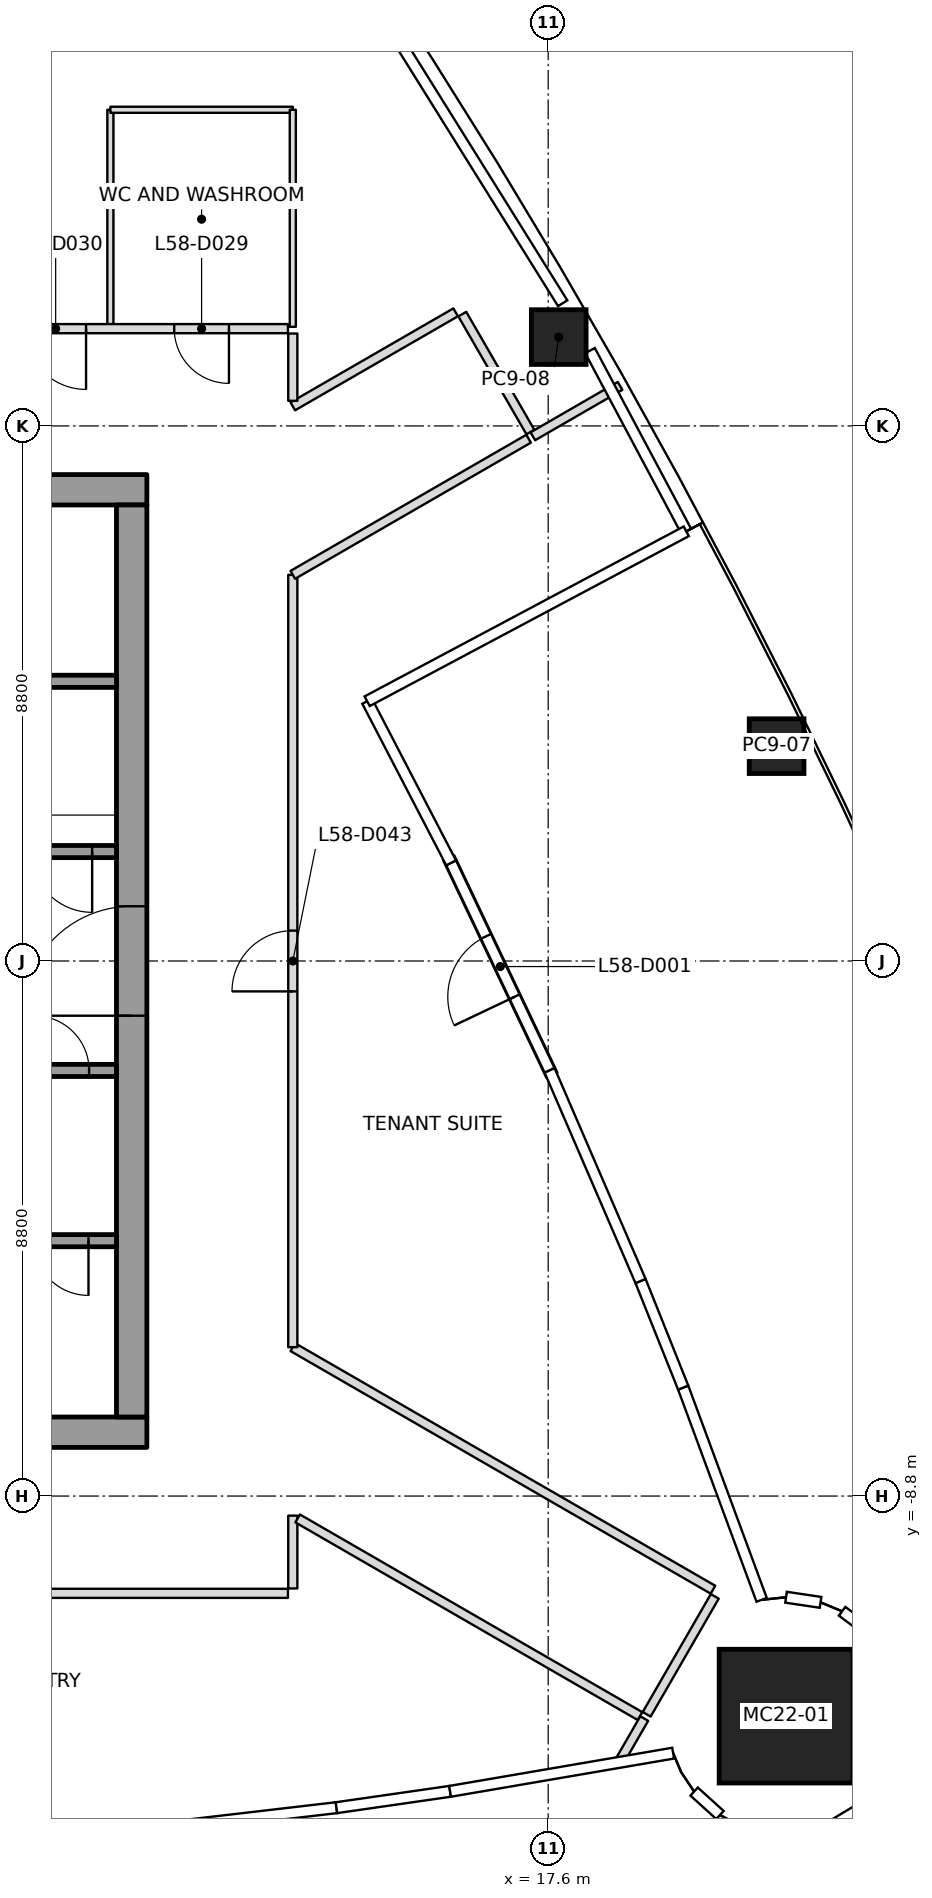
"""IFC4 building model, lengths in metres.
Left out: names, types, materials, properties, quantities, classifications, styles, units other than length and angle.
Written with IfcOpenShell. Run it as: python <this file> out.ifc"""

import sys

from ifc_helpers import new_model, si_unit, direction, frame, frame_2d, origin, origin_2d, place, context, subcontext, project, spatial, rectangle, extrude, element, fill, save


model = new_model("IFC4")
c1 = context("Model", 3, precision=1e-05, world=origin(), true_north=direction((0.0, 1.0)))
c2 = subcontext(c1, "Body", "Model", "MODEL_VIEW")
j1 = project(units=[si_unit("LENGTHUNIT", "METRE"), si_unit("PLANEANGLEUNIT", "RADIAN")], contexts=[c1])
p1 = place(None, origin())
s1 = spatial("IfcSite", under=j1, at=p1, CompositionType="ELEMENT")
p2 = place(p1, origin())
s2 = spatial("IfcBuilding", under=s1, at=p2, CompositionType="ELEMENT")
p3 = place(p2, frame((0.0, 0.0, 259.0)))
s3 = spatial("IfcBuildingStorey", under=s2, at=p3, CompositionType="ELEMENT", Elevation=259.0)
p4 = place(p3, frame((21.512, -12.42, 0.0), z_axis=(-0.027817676907, 0.016043967164, 0.999484250986), x_axis=(0.999613013546, 0.000446478676, 0.027814093645)))
e1 = element("IfcColumn", 1, at=p4, inside=s3, PredefinedType="COLUMN", context=c2, shape_type="SweptSolid", body=[
    extrude(rectangle(XDim=2.2, YDim=2.2, at=origin_2d()), origin(), (0.0, 0.0, 1.0), 4.002),
])
p5 = place(p3, frame((21.356, 3.533, 0.0), z_axis=(-0.014036674448, 0.002013957638, 0.999899452818), x_axis=(-0.439532201194, 0.89819139108, -0.007979292125)))
e2 = element("IfcColumn", 2, at=p5, inside=s3, PredefinedType="COLUMN", context=c2, shape_type="SweptSolid", body=[
    extrude(rectangle(XDim=0.9, YDim=0.9, at=origin_2d()), origin(), (0.0, 0.0, 1.0), 4.0),
])
p6 = place(p3, frame((17.773, 10.261, 0.0), z_axis=(-0.009887049298, -0.00573692984, 0.999934664812), x_axis=(-0.499975560967, 0.866039512843, 2.5126546e-05)))
e3 = element("IfcColumn", 3, at=p6, inside=s3, PredefinedType="COLUMN", context=c2, shape_type="SweptSolid", body=[
    extrude(rectangle(XDim=0.9, YDim=0.9, at=origin_2d()), origin(), (0.0, 0.0, 1.0), 4.0),
])
p7 = place(p3, frame((-11.0, -7.75, 0.0), z_axis=(0.0, 0.0, 1.0), x_axis=(1.0, 0.0, 0.0)))
e4 = element("IfcWall", 4, at=p7, inside=s3, PredefinedType="SHEAR", context=c2, shape_type="SweptSolid", body=[
    extrude(rectangle(XDim=22.0, YDim=0.5, at=frame_2d((11.0, 0.0))), origin(), (0.0, 0.0, 1.0), 4.0),
])
p8 = place(p7, frame((10.45, 0.0, 0.0)))
e5 = element("IfcOpeningElement", 5, at=p8, cuts=e4, PredefinedType="OPENING", context=c2, shape_type="SweptSolid", body=[
    extrude(rectangle(XDim=1.1, YDim=2.1, at=frame_2d((0.55, 1.05))), frame((0.0, 0.25, 0.0), z_axis=(0.0, -1.0, 0.0), x_axis=(1.0, 0.0, 0.0)), (0.0, 0.0, 1.0), 0.5),
])
p9 = place(p3, frame((-11.0, 7.75, 0.0), z_axis=(0.0, 0.0, 1.0), x_axis=(1.0, 0.0, 0.0)))
e6 = element("IfcWall", 6, at=p9, inside=s3, PredefinedType="SHEAR", context=c2, shape_type="SweptSolid", body=[
    extrude(rectangle(XDim=22.0, YDim=0.5, at=frame_2d((11.0, 0.0))), origin(), (0.0, 0.0, 1.0), 4.0),
])
p10 = place(p9, frame((10.45, 0.0, 0.0)))
e7 = element("IfcOpeningElement", 7, at=p10, cuts=e6, PredefinedType="OPENING", context=c2, shape_type="SweptSolid", body=[
    extrude(rectangle(XDim=1.1, YDim=2.1, at=frame_2d((0.55, 1.05))), frame((0.0, 0.25, 0.0), z_axis=(0.0, -1.0, 0.0), x_axis=(1.0, 0.0, 0.0)), (0.0, 0.0, 1.0), 0.5),
])
p11 = place(p3, frame((10.75, -7.5, 0.0), z_axis=(0.0, 0.0, 1.0), x_axis=(0.0, 1.0, 0.0)))
e8 = element("IfcWall", 8, at=p11, inside=s3, PredefinedType="SHEAR", context=c2, shape_type="SweptSolid", body=[
    extrude(rectangle(XDim=15.0, YDim=0.5, at=frame_2d((7.5, 0.0))), origin(), (0.0, 0.0, 1.0), 4.0),
])
p12 = place(p11, frame((6.6, 0.0, 0.0)))
e9 = element("IfcOpeningElement", 9, at=p12, cuts=e8, PredefinedType="OPENING", context=c2, shape_type="SweptSolid", body=[
    extrude(rectangle(XDim=1.8, YDim=2.1, at=frame_2d((0.9, 1.05))), frame((0.0, 0.25, 0.0), z_axis=(0.0, -1.0, 0.0), x_axis=(1.0, 0.0, 0.0)), (0.0, 0.0, 1.0), 0.5),
])
p13 = place(p3, frame((17.661, -1.878, 0.0), z_axis=(0.0, 0.0, 1.0), x_axis=(-0.428826415078, 0.903386908103, 0.0)))
e10 = element("IfcWall", 10, at=p13, inside=s3, PredefinedType="SOLIDWALL", context=c2, shape_type="SweptSolid", body=[
    extrude(rectangle(XDim=3.956, YDim=0.2, at=frame_2d((1.978, 0.0))), origin(), (0.0, 0.0, 1.0), 3.317),
])
p14 = place(p13, frame((1.428, 0.0, 0.0)))
e11 = element("IfcOpeningElement", 11, at=p14, cuts=e10, PredefinedType="OPENING", context=c2, shape_type="SweptSolid", body=[
    extrude(rectangle(XDim=1.1, YDim=2.1, at=frame_2d((0.55, 1.05))), frame((0.0, 0.1, 0.0), z_axis=(0.0, -1.0, 0.0), x_axis=(1.0, 0.0, 0.0)), (0.0, 0.0, 1.0), 0.2),
])
p15 = place(p3, frame((10.5, -4.6, 0.0), z_axis=(0.0, 0.0, 1.0), x_axis=(-1.0, 0.0, 0.0)))
e12 = element("IfcWall", 12, at=p15, inside=s3, PredefinedType="SOLIDWALL", context=c2, shape_type="SweptSolid", body=[
    extrude(rectangle(XDim=1.8, YDim=0.2, at=frame_2d((0.9, 0.0))), origin(), (0.0, 0.0, 1.0), 3.85),
])
p16 = place(p15, frame((0.46, 0.0, 0.0)))
e13 = element("IfcOpeningElement", 13, at=p16, cuts=e12, PredefinedType="OPENING", context=c2, shape_type="SweptSolid", body=[
    extrude(rectangle(XDim=0.9, YDim=2.1, at=frame_2d((0.45, 1.05))), frame((0.0, 0.1, 0.0), z_axis=(0.0, -1.0, 0.0), x_axis=(1.0, 0.0, 0.0)), (0.0, 0.0, 1.0), 0.2),
])
p17 = place(p3, frame((8.7, -1.8, 0.0), z_axis=(0.0, 0.0, 1.0), x_axis=(1.0, 0.0, 0.0)))
e14 = element("IfcWall", 14, at=p17, inside=s3, PredefinedType="SOLIDWALL", context=c2, shape_type="SweptSolid", body=[
    extrude(rectangle(XDim=1.8, YDim=0.2, at=frame_2d((0.9, 0.0))), origin(), (0.0, 0.0, 1.0), 3.85),
])
p18 = place(p17, frame((0.45, 0.0, 0.0)))
e15 = element("IfcOpeningElement", 15, at=p18, cuts=e14, PredefinedType="OPENING", context=c2, shape_type="SweptSolid", body=[
    extrude(rectangle(XDim=0.9, YDim=2.1, at=frame_2d((0.45, 1.05))), frame((0.0, 0.1, 0.0), z_axis=(0.0, -1.0, 0.0), x_axis=(1.0, 0.0, 0.0)), (0.0, 0.0, 1.0), 0.2),
])
p19 = place(p3, frame((10.5, 1.8, 0.0), z_axis=(0.0, 0.0, 1.0), x_axis=(-1.0, 0.0, 0.0)))
e16 = element("IfcWall", 16, at=p19, inside=s3, PredefinedType="SOLIDWALL", context=c2, shape_type="SweptSolid", body=[
    extrude(rectangle(XDim=1.8, YDim=0.2, at=frame_2d((0.9, 0.0))), origin(), (0.0, 0.0, 1.0), 3.85),
])
p20 = place(p19, frame((0.4, 0.0, 0.0)))
e17 = element("IfcOpeningElement", 17, at=p20, cuts=e16, PredefinedType="OPENING", context=c2, shape_type="SweptSolid", body=[
    extrude(rectangle(XDim=1.0, YDim=2.1, at=frame_2d((0.5, 1.05))), frame((0.0, 0.1, 0.0), z_axis=(0.0, -1.0, 0.0), x_axis=(1.0, 0.0, 0.0)), (0.0, 0.0, 1.0), 0.2),
])
p21 = place(p3, frame((10.5, 4.6, 0.0), z_axis=(0.0, 0.0, 1.0), x_axis=(-1.0, 0.0, 0.0)))
e18 = element("IfcWall", 18, at=p21, inside=s3, PredefinedType="SOLIDWALL", context=c2, shape_type="SweptSolid", body=[
    extrude(rectangle(XDim=1.8, YDim=0.2, at=frame_2d((0.9, 0.0))), origin(), (0.0, 0.0, 1.0), 3.85),
])
p22 = place(p3, frame((18.782, 9.458, 0.0), z_axis=(0.0, 0.0, 1.0), x_axis=(-0.865994143547, -0.500054140411, 0.0)))
e19 = element("IfcWall", 19, at=p22, inside=s3, PredefinedType="PARTITIONING", context=c2, shape_type="SweptSolid", body=[
    extrude(rectangle(XDim=1.656, YDim=0.15, at=frame_2d((0.828, 0.0))), origin(), (0.0, 0.0, 1.0), 3.234),
])
p23 = place(p3, frame((19.18, -12.459, 0.0), z_axis=(0.0, 0.0, 1.0), x_axis=(-0.499930913282, -0.866065287345, 0.0)))
e20 = element("IfcWall", 20, at=p23, inside=s3, PredefinedType="PARTITIONING", context=c2, shape_type="SweptSolid", body=[
    extrude(rectangle(XDim=0.845, YDim=0.15, at=frame_2d((0.422, 0.0))), origin(), (0.0, 0.0, 1.0), 3.45),
])
p24 = place(p3, frame((1.2, -10.4, 0.0), z_axis=(0.0, 0.0, 1.0), x_axis=(1.0, 0.0, 0.0)))
e21 = element("IfcWall", 21, at=p24, inside=s3, PredefinedType="PARTITIONING", context=c2, shape_type="SweptSolid", body=[
    extrude(rectangle(XDim=12.12, YDim=0.15, at=frame_2d((6.06, 0.0))), origin(), (0.0, 0.0, 1.0), 3.317),
])
p25 = place(p24, frame((5.6, 0.0, 0.0)))
e22 = element("IfcOpeningElement", 22, at=p25, cuts=e21, PredefinedType="OPENING", context=c2, shape_type="SweptSolid", body=[
    extrude(rectangle(XDim=1.0, YDim=2.1, at=frame_2d((0.5, 1.05))), frame((0.0, 0.075, 0.0), z_axis=(0.0, -1.0, 0.0), x_axis=(1.0, 0.0, 0.0)), (0.0, 0.0, 1.0), 0.15),
])
p26 = place(p3, frame((13.32, 10.4, 0.0), z_axis=(0.0, 0.0, 1.0), x_axis=(-1.0, 0.0, 0.0)))
e23 = element("IfcWall", 23, at=p26, inside=s3, PredefinedType="PARTITIONING", context=c2, shape_type="SweptSolid", body=[
    extrude(rectangle(XDim=4.62, YDim=0.15, at=frame_2d((2.31, 0.0))), origin(), (0.0, 0.0, 1.0), 3.443),
])
p27 = place(p26, frame((0.97, 0.0, 0.0)))
e24 = element("IfcOpeningElement", 24, at=p27, cuts=e23, PredefinedType="OPENING", context=c2, shape_type="SweptSolid", body=[
    extrude(rectangle(XDim=0.9, YDim=2.1, at=frame_2d((0.45, 1.05))), frame((0.0, 0.075, 0.0), z_axis=(0.0, -1.0, 0.0), x_axis=(1.0, 0.0, 0.0)), (0.0, 0.0, 1.0), 0.15),
])
p28 = place(p26, frame((3.32, 0.0, 0.0)))
e25 = element("IfcOpeningElement", 25, at=p28, cuts=e23, PredefinedType="OPENING", context=c2, shape_type="SweptSolid", body=[
    extrude(rectangle(XDim=1.0, YDim=2.1, at=frame_2d((0.5, 1.05))), frame((0.0, 0.075, 0.0), z_axis=(0.0, -1.0, 0.0), x_axis=(1.0, 0.0, 0.0)), (0.0, 0.0, 1.0), 0.15),
])
p29 = place(p3, frame((13.4, -10.32, 0.0), z_axis=(0.0, 0.0, 1.0), x_axis=(0.0, 1.0, 0.0)))
e26 = element("IfcWall", 26, at=p29, inside=s3, PredefinedType="PARTITIONING", context=c2, shape_type="SweptSolid", body=[
    extrude(rectangle(XDim=1.198, YDim=0.15, at=frame_2d((0.599, 0.0))), origin(), (0.0, 0.0, 1.0), 3.233),
])
p30 = place(p3, frame((13.479, -9.168, 0.0), z_axis=(0.0, 0.0, 1.0), x_axis=(0.866028026295, -0.499995457651, 0.0)))
e27 = element("IfcWall", 27, at=p30, inside=s3, PredefinedType="PARTITIONING", context=c2, shape_type="SweptSolid", body=[
    extrude(rectangle(XDim=6.502, YDim=0.15, at=frame_2d((3.251, 0.0))), origin(), (0.0, 0.0, 1.0), 3.233),
])
p31 = place(p3, frame((16.078, 10.668, 0.0), z_axis=(0.0, 0.0, 1.0), x_axis=(-0.866029156965, -0.499993499245, 0.0)))
e28 = element("IfcWall", 28, at=p31, inside=s3, PredefinedType="PARTITIONING", context=c2, shape_type="SweptSolid", body=[
    extrude(rectangle(XDim=3.093, YDim=0.15, at=frame_2d((1.546, 0.0))), origin(), (0.0, 0.0, 1.0), 3.45),
])
p32 = place(p3, frame((13.4, 9.214, 0.0), z_axis=(0.0, 0.0, 1.0), x_axis=(0.0, 1.0, 0.0)))
e29 = element("IfcWall", 29, at=p32, inside=s3, PredefinedType="PARTITIONING", context=c2, shape_type="SweptSolid", body=[
    extrude(rectangle(XDim=1.106, YDim=0.15, at=frame_2d((0.553, 0.0))), origin(), (0.0, 0.0, 1.0), 3.45),
])
p33 = place(p3, frame((17.308, 8.699, 0.0), z_axis=(0.0, 0.0, 1.0), x_axis=(-0.500030632641, 0.866007717299, 0.0)))
e30 = element("IfcWall", 30, at=p33, inside=s3, PredefinedType="PARTITIONING", context=c2, shape_type="SweptSolid", body=[
    extrude(rectangle(XDim=2.24, YDim=0.15, at=frame_2d((1.12, 0.0))), origin(), (0.0, 0.0, 1.0), 3.45),
])
p34 = place(p3, frame((20.311, -10.341, 0.0), z_axis=(0.0, 0.0, 1.0), x_axis=(-0.866031719379, 0.499989060909, 0.0)))
e31 = element("IfcWall", 31, at=p34, inside=s3, PredefinedType="PARTITIONING", context=c2, shape_type="SweptSolid", body=[
    extrude(rectangle(XDim=7.98, YDim=0.15, at=frame_2d((3.99, 0.0))), origin(), (0.0, 0.0, 1.0), 3.317),
])
p35 = place(p3, frame((13.4, -6.351, 0.0), z_axis=(0.0, 0.0, 1.0), x_axis=(0.0, 1.0, 0.0)))
e32 = element("IfcWall", 32, at=p35, inside=s3, PredefinedType="PARTITIONING", context=c2, shape_type="SweptSolid", body=[
    extrude(rectangle(XDim=12.702, YDim=0.15, at=frame_2d((6.351, 0.0))), origin(), (0.0, 0.0, 1.0), 3.317),
])
p36 = place(p35, frame((5.851, 0.0, 0.0)))
e33 = element("IfcOpeningElement", 33, at=p36, cuts=e32, PredefinedType="OPENING", context=c2, shape_type="SweptSolid", body=[
    extrude(rectangle(XDim=1.0, YDim=2.1, at=frame_2d((0.5, 1.05))), frame((0.0, 0.075, 0.0), z_axis=(0.0, -1.0, 0.0), x_axis=(1.0, 0.0, 0.0)), (0.0, 0.0, 1.0), 0.15),
])
p37 = place(p3, frame((13.4, 6.351, 0.0), z_axis=(0.0, 0.0, 1.0), x_axis=(0.866020361036, 0.500008734195, 0.0)))
e34 = element("IfcWall", 34, at=p37, inside=s3, PredefinedType="PARTITIONING", context=c2, shape_type="SweptSolid", body=[
    extrude(rectangle(XDim=4.479, YDim=0.15, at=frame_2d((2.239, 0.0))), origin(), (0.0, 0.0, 1.0), 3.45),
])
p38 = place(p3, frame((19.22, -12.39, 0.0), z_axis=(0.0, 0.0, 1.0), x_axis=(0.500030632641, 0.866007717299, 0.0)))
e35 = element("IfcWall", 35, at=p38, inside=s3, PredefinedType="PARTITIONING", context=c2, shape_type="SweptSolid", body=[
    extrude(rectangle(XDim=2.24, YDim=0.15, at=frame_2d((1.12, 0.0))), origin(), (0.0, 0.0, 1.0), 3.233),
])
p39 = place(p3, frame((10.4, 10.43, 0.0), z_axis=(0.0, 0.0, 1.0), x_axis=(0.0, 1.0, 0.0)))
e36 = element("IfcWall", 36, at=p39, inside=s3, PredefinedType="PARTITIONING", context=c2, shape_type="SweptSolid", body=[
    extrude(rectangle(XDim=3.57, YDim=0.1, at=frame_2d((1.785, 0.0))), origin(), (0.0, 0.0, 1.0), 3.45),
])
p40 = place(p3, frame((10.4, 14.0, 0.0), z_axis=(0.0, 0.0, 1.0), x_axis=(1.0, 0.0, 0.0)))
e37 = element("IfcWall", 37, at=p40, inside=s3, PredefinedType="PARTITIONING", context=c2, shape_type="SweptSolid", body=[
    extrude(rectangle(XDim=3.0, YDim=0.1, at=frame_2d((1.5, 0.0))), origin(), (0.0, 0.0, 1.0), 3.45),
])
p41 = place(p3, frame((13.4, 14.0, 0.0), z_axis=(0.0, 0.0, 1.0), x_axis=(0.0, -1.0, 0.0)))
e38 = element("IfcWall", 38, at=p41, inside=s3, PredefinedType="PARTITIONING", context=c2, shape_type="SweptSolid", body=[
    extrude(rectangle(XDim=3.57, YDim=0.1, at=frame_2d((1.785, 0.0))), origin(), (0.0, 0.0, 1.0), 3.443),
])
p42 = place(p14, origin())
e39 = element("IfcDoor", 39, at=p42, inside=s3, OperationType="SINGLE_SWING_RIGHT", PredefinedType="DOOR", context=c2, shape_type="SweptSolid", body=[
    extrude(rectangle(XDim=1.1, YDim=2.1, at=frame_2d((0.55, 1.05))), frame((0.0, 0.025, 0.0), z_axis=(0.0, -1.0, 0.0), x_axis=(1.0, 0.0, 0.0)), (0.0, 0.0, 1.0), 0.05),
])
fill(e11, e39)
p43 = place(p27, origin())
e40 = element("IfcDoor", 40, at=p43, inside=s3, OperationType="SINGLE_SWING_RIGHT", PredefinedType="DOOR", context=c2, shape_type="SweptSolid", body=[
    extrude(rectangle(XDim=0.9, YDim=2.1, at=frame_2d((0.45, 1.05))), frame((0.0, 0.025, 0.0), z_axis=(0.0, -1.0, 0.0), x_axis=(1.0, 0.0, 0.0)), (0.0, 0.0, 1.0), 0.05),
])
fill(e24, e40)
p44 = place(p28, origin())
e41 = element("IfcDoor", 41, at=p44, inside=s3, OperationType="SINGLE_SWING_LEFT", PredefinedType="DOOR", context=c2, shape_type="SweptSolid", body=[
    extrude(rectangle(XDim=1.0, YDim=2.1, at=frame_2d((0.5, 1.05))), frame((0.0, 0.025, 0.0), z_axis=(0.0, -1.0, 0.0), x_axis=(1.0, 0.0, 0.0)), (0.0, 0.0, 1.0), 0.05),
])
fill(e25, e41)
p45 = place(p36, origin())
e42 = element("IfcDoor", 42, at=p45, inside=s3, OperationType="SINGLE_SWING_LEFT", PredefinedType="DOOR", context=c2, shape_type="SweptSolid", body=[
    extrude(rectangle(XDim=1.0, YDim=2.1, at=frame_2d((0.5, 1.05))), frame((0.0, 0.025, 0.0), z_axis=(0.0, -1.0, 0.0), x_axis=(1.0, 0.0, 0.0)), (0.0, 0.0, 1.0), 0.05),
])
fill(e33, e42)
p46 = place(p20, origin())
e43 = element("IfcDoor", 43, at=p46, inside=s3, OperationType="SINGLE_SWING_LEFT", PredefinedType="DOOR", context=c2, shape_type="SweptSolid", body=[
    extrude(rectangle(XDim=1.0, YDim=2.1, at=frame_2d((0.5, 1.05))), frame((0.0, 0.025, 0.0), z_axis=(0.0, -1.0, 0.0), x_axis=(1.0, 0.0, 0.0)), (0.0, 0.0, 1.0), 0.05),
])
fill(e17, e43)
p47 = place(p16, origin())
e44 = element("IfcDoor", 44, at=p47, inside=s3, OperationType="SINGLE_SWING_RIGHT", PredefinedType="DOOR", context=c2, shape_type="SweptSolid", body=[
    extrude(rectangle(XDim=0.9, YDim=2.1, at=frame_2d((0.45, 1.05))), frame((0.0, 0.025, 0.0), z_axis=(0.0, -1.0, 0.0), x_axis=(1.0, 0.0, 0.0)), (0.0, 0.0, 1.0), 0.05),
])
fill(e13, e44)
p48 = place(p18, origin())
e45 = element("IfcDoor", 45, at=p48, inside=s3, OperationType="SINGLE_SWING_LEFT", PredefinedType="DOOR", context=c2, shape_type="SweptSolid", body=[
    extrude(rectangle(XDim=0.9, YDim=2.1, at=frame_2d((0.45, 1.05))), frame((0.0, 0.025, 0.0), z_axis=(0.0, -1.0, 0.0), x_axis=(1.0, 0.0, 0.0)), (0.0, 0.0, 1.0), 0.05),
])
fill(e15, e45)
p49 = place(p12, origin())
e46 = element("IfcDoor", 46, at=p49, inside=s3, OperationType="DOUBLE_DOOR_SINGLE_SWING", PredefinedType="DOOR", context=c2, shape_type="SweptSolid", body=[
    extrude(rectangle(XDim=1.8, YDim=2.1, at=frame_2d((0.9, 1.05))), frame((0.0, 0.025, 0.0), z_axis=(0.0, -1.0, 0.0), x_axis=(1.0, 0.0, 0.0)), (0.0, 0.0, 1.0), 0.05),
])
fill(e9, e46)
save(model, sys.argv[1])
